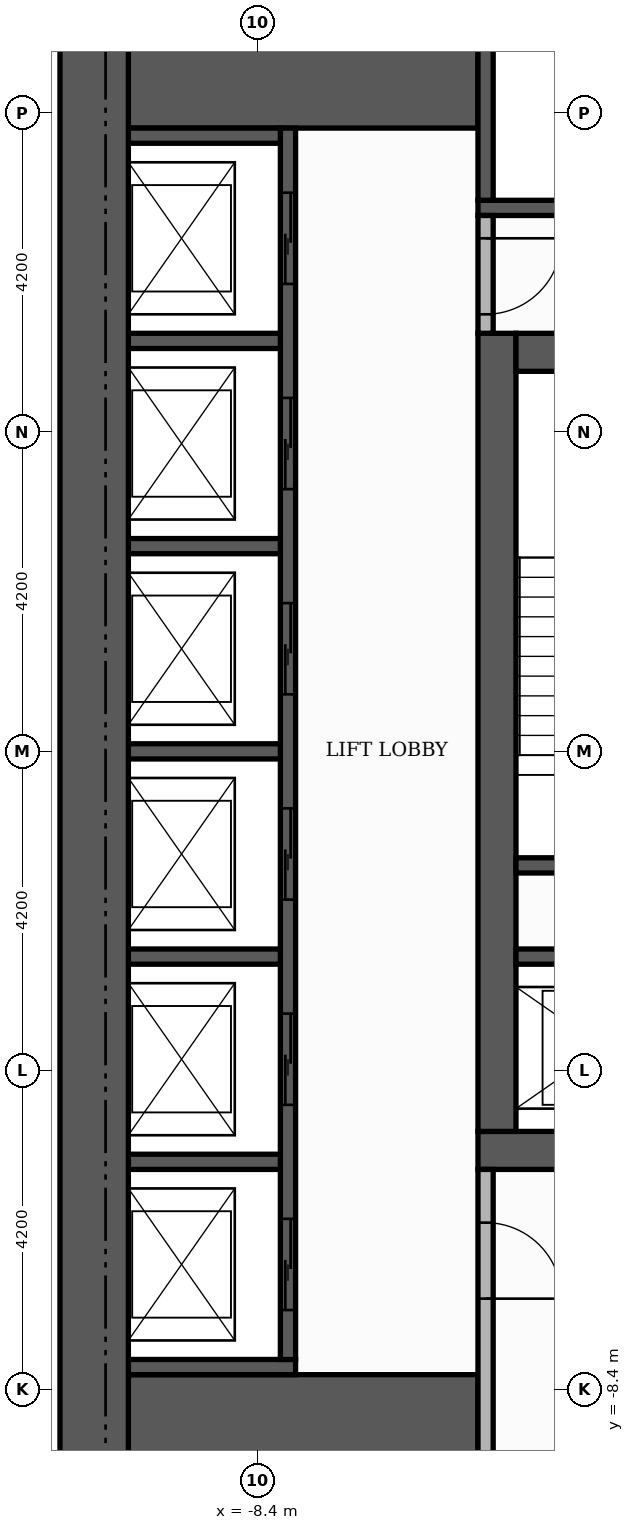
"""IFC4 building model, lengths in metres.
Left out: names, types, materials, properties, quantities, classifications, styles, units other than length and angle.
Written with IfcOpenShell. Run it as: python <this file> out.ifc"""

import sys

from ifc_helpers import new_model, si_unit, direction, frame, frame_2d, origin, place, context, subcontext, project, spatial, rectangle, extrude, element, fill, save


model = new_model("IFC4")
c1 = context("Model", 3, precision=1e-05, world=origin(), true_north=direction((0.0, 1.0)))
c2 = subcontext(c1, "Body", "Model", "MODEL_VIEW")
j1 = project(units=[si_unit("LENGTHUNIT", "METRE"), si_unit("PLANEANGLEUNIT", "RADIAN")], contexts=[c1])
p1 = place(None, origin())
s1 = spatial("IfcSite", under=j1, at=p1, CompositionType="ELEMENT")
p2 = place(p1, origin())
s2 = spatial("IfcBuilding", under=s1, at=p2, CompositionType="ELEMENT")
p3 = place(p2, frame((0.0, 0.0, 69.9)))
s3 = spatial("IfcBuildingStorey", under=s2, at=p3, CompositionType="ELEMENT", Elevation=69.9)
p4 = place(p3, frame((-5.5, -5.25, 0.0), z_axis=(0.0, 0.0, 1.0), x_axis=(1.0, 0.0, 0.0)))
e1 = element("IfcWall", 1, at=p4, inside=s3, PredefinedType="SHEAR", context=c2, shape_type="SweptSolid", body=[
    extrude(rectangle(XDim=11.0, YDim=0.5, at=frame_2d((5.5, 0.0))), origin(), (0.0, 0.0, 1.0), 3.4),
])
p5 = place(p4, frame((4.9, 0.0, 0.0)))
e2 = element("IfcOpeningElement", 2, at=p5, cuts=e1, PredefinedType="OPENING", context=c2, shape_type="SweptSolid", body=[
    extrude(rectangle(XDim=1.2, YDim=2.1, at=frame_2d((0.6, 1.05))), frame((0.0, 0.26, 0.0), z_axis=(0.0, -1.0, 0.0), x_axis=(1.0, 0.0, 0.0)), (0.0, 0.0, 1.0), 0.52),
])
p6 = place(p3, frame((-5.25, -5.0, 0.0), z_axis=(0.0, 0.0, 1.0), x_axis=(0.0, 1.0, 0.0)))
e3 = element("IfcWall", 3, at=p6, inside=s3, PredefinedType="SHEAR", context=c2, shape_type="SweptSolid", body=[
    extrude(rectangle(XDim=10.5, YDim=0.5, at=frame_2d((5.25, 0.0))), origin(), (0.0, 0.0, 1.0), 3.4),
])
p7 = place(p3, frame((-5.0, 5.25, 0.0), z_axis=(0.0, 0.0, 1.0), x_axis=(1.0, 0.0, 0.0)))
e4 = element("IfcWall", 4, at=p7, inside=s3, PredefinedType="SHEAR", context=c2, shape_type="SweptSolid", body=[
    extrude(rectangle(XDim=10.0, YDim=0.5, at=frame_2d((5.0, 0.0))), origin(), (0.0, 0.0, 1.0), 3.4),
])
p8 = place(p7, frame((4.4, 0.0, 0.0)))
e5 = element("IfcOpeningElement", 5, at=p8, cuts=e4, PredefinedType="OPENING", context=c2, shape_type="SweptSolid", body=[
    extrude(rectangle(XDim=1.2, YDim=2.1, at=frame_2d((0.6, 1.05))), frame((0.0, 0.26, 0.0), z_axis=(0.0, -1.0, 0.0), x_axis=(1.0, 0.0, 0.0)), (0.0, 0.0, 1.0), 0.52),
])
for number, where, z_axis, x_axis in (
    (6, (-10.1, -9.15, 0.0), (0.0, 0.0, 1.0), (1.0, 0.0, 0.0)),
    (7, (-10.1, 9.15, 0.0), (0.0, 0.0, 1.0), (1.0, 0.0, 0.0)),
):
    element("IfcWall", number, at=place(p3, frame(where, z_axis=z_axis, x_axis=x_axis)), inside=s3, PredefinedType="SHEAR", context=c2, shape_type="SweptSolid", body=[
        extrude(rectangle(XDim=4.6, YDim=1.9, at=frame_2d((2.3, 0.0))), origin(), (0.0, 0.0, 1.0), 3.4),
    ])
p9 = place(p3, frame((-5.0, -1.5, 0.0), z_axis=(0.0, 0.0, 1.0), x_axis=(1.0, 0.0, 0.0)))
e8 = element("IfcWall", 8, at=p9, inside=s3, PredefinedType="SHEAR", context=c2, shape_type="SweptSolid", body=[
    extrude(rectangle(XDim=3.05, YDim=0.2, at=frame_2d((1.525, 0.0))), origin(), (0.0, 0.0, 1.0), 3.4),
])
p10 = place(p3, frame((-5.5, 7.15, 0.0), z_axis=(0.0, 0.0, 1.0), x_axis=(1.0, 0.0, 0.0)))
e9 = element("IfcWall", 9, at=p10, inside=s3, PredefinedType="SHEAR", context=c2, shape_type="SweptSolid", body=[
    extrude(rectangle(XDim=6.8, YDim=0.2, at=frame_2d((3.4, 0.0))), origin(), (0.0, 0.0, 1.0), 3.4),
])
p11 = place(p3, frame((-5.4, 7.25, 0.0), z_axis=(0.0, 0.0, 1.0), x_axis=(0.0, 1.0, 0.0)))
e10 = element("IfcWall", 10, at=p11, inside=s3, PredefinedType="SHEAR", context=c2, shape_type="SweptSolid", body=[
    extrude(rectangle(XDim=2.85, YDim=0.2, at=frame_2d((1.425, 0.0))), origin(), (0.0, 0.0, 1.0), 3.4),
])
p12 = place(p3, frame((-10.1, -8.1, 0.0), z_axis=(0.0, 0.0, 1.0), x_axis=(1.0, 0.0, 0.0)))
e11 = element("IfcWall", 11, at=p12, inside=s3, PredefinedType="SHEAR", context=c2, shape_type="SweptSolid", body=[
    extrude(rectangle(XDim=2.2, YDim=0.2, at=frame_2d((1.1, 0.0))), origin(), (0.0, 0.0, 1.0), 3.4),
])
p13 = place(p3, frame((-8.0, -8.0, 0.0), z_axis=(0.0, 0.0, 1.0), x_axis=(0.0, 1.0, 0.0)))
e12 = element("IfcWall", 12, at=p13, inside=s3, PredefinedType="SHEAR", context=c2, shape_type="SweptSolid", body=[
    extrude(rectangle(XDim=16.2, YDim=0.2, at=frame_2d((8.1, 0.0))), origin(), (0.0, 0.0, 1.0), 3.4),
])
p14 = place(p13, frame((0.65, 0.0, 0.0)))
e13 = element("IfcOpeningElement", 13, at=p14, cuts=e12, PredefinedType="OPENING", context=c2, shape_type="SweptSolid", body=[
    extrude(rectangle(XDim=1.2, YDim=2.1, at=frame_2d((0.6, 1.05))), frame((0.0, 0.11, 0.0), z_axis=(0.0, -1.0, 0.0), x_axis=(1.0, 0.0, 0.0)), (0.0, 0.0, 1.0), 0.22),
])
p15 = place(p13, frame((3.35, 0.0, 0.0)))
e14 = element("IfcOpeningElement", 14, at=p15, cuts=e12, PredefinedType="OPENING", context=c2, shape_type="SweptSolid", body=[
    extrude(rectangle(XDim=1.2, YDim=2.1, at=frame_2d((0.6, 1.05))), frame((0.0, 0.11, 0.0), z_axis=(0.0, -1.0, 0.0), x_axis=(1.0, 0.0, 0.0)), (0.0, 0.0, 1.0), 0.22),
])
p16 = place(p13, frame((6.05, 0.0, 0.0)))
e15 = element("IfcOpeningElement", 15, at=p16, cuts=e12, PredefinedType="OPENING", context=c2, shape_type="SweptSolid", body=[
    extrude(rectangle(XDim=1.2, YDim=2.1, at=frame_2d((0.6, 1.05))), frame((0.0, 0.11, 0.0), z_axis=(0.0, -1.0, 0.0), x_axis=(1.0, 0.0, 0.0)), (0.0, 0.0, 1.0), 0.22),
])
p17 = place(p13, frame((8.75, 0.0, 0.0)))
e16 = element("IfcOpeningElement", 16, at=p17, cuts=e12, PredefinedType="OPENING", context=c2, shape_type="SweptSolid", body=[
    extrude(rectangle(XDim=1.2, YDim=2.1, at=frame_2d((0.6, 1.05))), frame((0.0, 0.11, 0.0), z_axis=(0.0, -1.0, 0.0), x_axis=(1.0, 0.0, 0.0)), (0.0, 0.0, 1.0), 0.22),
])
p18 = place(p13, frame((11.45, 0.0, 0.0)))
e17 = element("IfcOpeningElement", 17, at=p18, cuts=e12, PredefinedType="OPENING", context=c2, shape_type="SweptSolid", body=[
    extrude(rectangle(XDim=1.2, YDim=2.1, at=frame_2d((0.6, 1.05))), frame((0.0, 0.11, 0.0), z_axis=(0.0, -1.0, 0.0), x_axis=(1.0, 0.0, 0.0)), (0.0, 0.0, 1.0), 0.22),
])
p19 = place(p13, frame((14.15, 0.0, 0.0)))
e18 = element("IfcOpeningElement", 18, at=p19, cuts=e12, PredefinedType="OPENING", context=c2, shape_type="SweptSolid", body=[
    extrude(rectangle(XDim=1.2, YDim=2.1, at=frame_2d((0.6, 1.05))), frame((0.0, 0.11, 0.0), z_axis=(0.0, -1.0, 0.0), x_axis=(1.0, 0.0, 0.0)), (0.0, 0.0, 1.0), 0.22),
])
for number, where, z_axis, x_axis in (
    (19, (-10.1, -5.4, 0.0), (0.0, 0.0, 1.0), (1.0, 0.0, 0.0)),
    (20, (-10.1, -2.7, 0.0), (0.0, 0.0, 1.0), (1.0, 0.0, 0.0)),
):
    element("IfcWall", number, at=place(p3, frame(where, z_axis=z_axis, x_axis=x_axis)), inside=s3, PredefinedType="SHEAR", context=c2, shape_type="SweptSolid", body=[
        extrude(rectangle(XDim=2.0, YDim=0.2, at=frame_2d((1.0, 0.0))), origin(), (0.0, 0.0, 1.0), 3.4),
    ])
p20 = place(p3, frame((-5.0, -2.7, 0.0), z_axis=(0.0, 0.0, 1.0), x_axis=(1.0, 0.0, 0.0)))
e21 = element("IfcWall", 21, at=p20, inside=s3, PredefinedType="SHEAR", context=c2, shape_type="SweptSolid", body=[
    extrude(rectangle(XDim=2.85, YDim=0.2, at=frame_2d((1.425, 0.0))), origin(), (0.0, 0.0, 1.0), 3.4),
])
for number, where, z_axis, x_axis in (
    (22, (-10.1, 0.0, 0.0), (0.0, 0.0, 1.0), (1.0, 0.0, 0.0)),
    (23, (-10.1, 2.7, 0.0), (0.0, 0.0, 1.0), (1.0, 0.0, 0.0)),
    (24, (-10.1, 5.4, 0.0), (0.0, 0.0, 1.0), (1.0, 0.0, 0.0)),
    (25, (-10.1, 8.1, 0.0), (0.0, 0.0, 1.0), (1.0, 0.0, 0.0)),
):
    element("IfcWall", number, at=place(p3, frame(where, z_axis=z_axis, x_axis=x_axis)), inside=s3, PredefinedType="SHEAR", context=c2, shape_type="SweptSolid", body=[
        extrude(rectangle(XDim=2.0, YDim=0.2, at=frame_2d((1.0, 0.0))), origin(), (0.0, 0.0, 1.0), 3.4),
    ])
p21 = place(p3, frame((-10.55, -10.1, 0.0), z_axis=(0.0, 0.0, 1.0), x_axis=(0.0, 1.0, 0.0)))
e26 = element("IfcWall", 26, at=p21, inside=s3, PredefinedType="SHEAR", context=c2, shape_type="SweptSolid", body=[
    extrude(rectangle(XDim=20.2, YDim=0.9, at=frame_2d((10.1, 0.0))), origin(), (0.0, 0.0, 1.0), 3.4),
])
p22 = place(p3, frame((-5.4, -10.1, 0.0), z_axis=(0.0, 0.0, 1.0), x_axis=(0.0, 1.0, 0.0)))
e27 = element("IfcWall", 27, at=p22, inside=s3, PredefinedType="PARTITIONING", context=c2, shape_type="SweptSolid", body=[
    extrude(rectangle(XDim=4.6, YDim=0.2, at=frame_2d((2.3, 0.0))), origin(), (0.0, 0.0, 1.0), 3.4),
])
p23 = place(p22, frame((2.9, 0.0, 0.0)))
e28 = element("IfcOpeningElement", 28, at=p23, cuts=e27, PredefinedType="OPENING", context=c2, shape_type="SweptSolid", body=[
    extrude(rectangle(XDim=1.0, YDim=2.1, at=frame_2d((0.5, 1.05))), frame((0.0, 0.11, 0.0), z_axis=(0.0, -1.0, 0.0), x_axis=(1.0, 0.0, 0.0)), (0.0, 0.0, 1.0), 0.22),
])
p24 = place(p3, frame((-5.4, 5.5, 0.0), z_axis=(0.0, 0.0, 1.0), x_axis=(0.0, 1.0, 0.0)))
e29 = element("IfcWall", 29, at=p24, inside=s3, PredefinedType="PARTITIONING", context=c2, shape_type="SweptSolid", body=[
    extrude(rectangle(XDim=1.55, YDim=0.2, at=frame_2d((0.775, 0.0))), origin(), (0.0, 0.0, 1.0), 3.4),
])
p25 = place(p24, frame((0.25, 0.0, 0.0)))
e30 = element("IfcOpeningElement", 30, at=p25, cuts=e29, PredefinedType="OPENING", context=c2, shape_type="SweptSolid", body=[
    extrude(rectangle(XDim=1.0, YDim=2.1, at=frame_2d((0.5, 1.05))), frame((0.0, 0.11, 0.0), z_axis=(0.0, -1.0, 0.0), x_axis=(1.0, 0.0, 0.0)), (0.0, 0.0, 1.0), 0.22),
])
p26 = place(p14, origin())
e31 = element("IfcDoor", 31, at=p26, inside=s3, OperationType="SLIDING_TO_LEFT", PredefinedType="DOOR", context=c2, shape_type="SweptSolid", body=[
    extrude(rectangle(XDim=1.2, YDim=2.1, at=frame_2d((0.6, 1.05))), frame((0.0, 0.025, 0.0), z_axis=(0.0, -1.0, 0.0), x_axis=(1.0, 0.0, 0.0)), (0.0, 0.0, 1.0), 0.05),
])
fill(e13, e31)
p27 = place(p15, origin())
e32 = element("IfcDoor", 32, at=p27, inside=s3, OperationType="SLIDING_TO_LEFT", PredefinedType="DOOR", context=c2, shape_type="SweptSolid", body=[
    extrude(rectangle(XDim=1.2, YDim=2.1, at=frame_2d((0.6, 1.05))), frame((0.0, 0.025, 0.0), z_axis=(0.0, -1.0, 0.0), x_axis=(1.0, 0.0, 0.0)), (0.0, 0.0, 1.0), 0.05),
])
fill(e14, e32)
p28 = place(p16, origin())
e33 = element("IfcDoor", 33, at=p28, inside=s3, OperationType="SLIDING_TO_LEFT", PredefinedType="DOOR", context=c2, shape_type="SweptSolid", body=[
    extrude(rectangle(XDim=1.2, YDim=2.1, at=frame_2d((0.6, 1.05))), frame((0.0, 0.025, 0.0), z_axis=(0.0, -1.0, 0.0), x_axis=(1.0, 0.0, 0.0)), (0.0, 0.0, 1.0), 0.05),
])
fill(e15, e33)
p29 = place(p17, origin())
e34 = element("IfcDoor", 34, at=p29, inside=s3, OperationType="SLIDING_TO_LEFT", PredefinedType="DOOR", context=c2, shape_type="SweptSolid", body=[
    extrude(rectangle(XDim=1.2, YDim=2.1, at=frame_2d((0.6, 1.05))), frame((0.0, 0.025, 0.0), z_axis=(0.0, -1.0, 0.0), x_axis=(1.0, 0.0, 0.0)), (0.0, 0.0, 1.0), 0.05),
])
fill(e16, e34)
p30 = place(p18, origin())
e35 = element("IfcDoor", 35, at=p30, inside=s3, OperationType="SLIDING_TO_LEFT", PredefinedType="DOOR", context=c2, shape_type="SweptSolid", body=[
    extrude(rectangle(XDim=1.2, YDim=2.1, at=frame_2d((0.6, 1.05))), frame((0.0, 0.025, 0.0), z_axis=(0.0, -1.0, 0.0), x_axis=(1.0, 0.0, 0.0)), (0.0, 0.0, 1.0), 0.05),
])
fill(e17, e35)
p31 = place(p19, origin())
e36 = element("IfcDoor", 36, at=p31, inside=s3, OperationType="SLIDING_TO_LEFT", PredefinedType="DOOR", context=c2, shape_type="SweptSolid", body=[
    extrude(rectangle(XDim=1.2, YDim=2.1, at=frame_2d((0.6, 1.05))), frame((0.0, 0.025, 0.0), z_axis=(0.0, -1.0, 0.0), x_axis=(1.0, 0.0, 0.0)), (0.0, 0.0, 1.0), 0.05),
])
fill(e18, e36)
p32 = place(p25, frame((1.0, 0.0, 0.0), z_axis=(0.0, 0.0, 1.0), x_axis=(-1.0, 0.0, 0.0)))
e37 = element("IfcDoor", 37, at=p32, inside=s3, OperationType="SINGLE_SWING_RIGHT", PredefinedType="DOOR", context=c2, shape_type="SweptSolid", body=[
    extrude(rectangle(XDim=1.0, YDim=2.1, at=frame_2d((0.5, 1.05))), frame((0.0, 0.025, 0.0), z_axis=(0.0, -1.0, 0.0), x_axis=(1.0, 0.0, 0.0)), (0.0, 0.0, 1.0), 0.05),
])
fill(e30, e37)
p33 = place(p23, frame((1.0, 0.0, 0.0), z_axis=(0.0, 0.0, 1.0), x_axis=(-1.0, 0.0, 0.0)))
e38 = element("IfcDoor", 38, at=p33, inside=s3, OperationType="SINGLE_SWING_LEFT", PredefinedType="DOOR", context=c2, shape_type="SweptSolid", body=[
    extrude(rectangle(XDim=1.0, YDim=2.1, at=frame_2d((0.5, 1.05))), frame((0.0, 0.025, 0.0), z_axis=(0.0, -1.0, 0.0), x_axis=(1.0, 0.0, 0.0)), (0.0, 0.0, 1.0), 0.05),
])
fill(e28, e38)
save(model, sys.argv[1])
